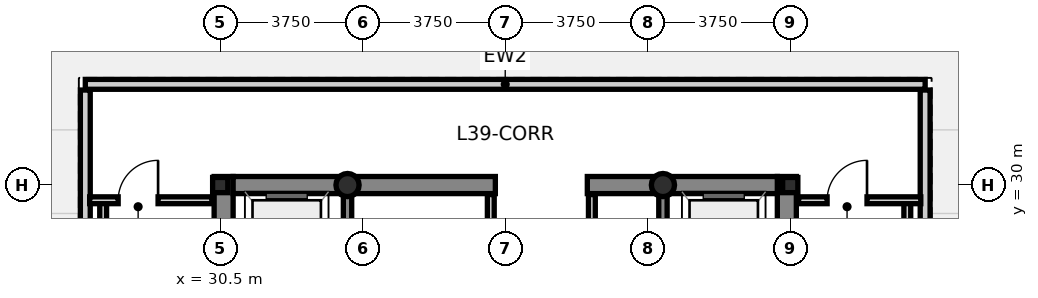
"""IFC4 building model, lengths in metres.
Left out: names, types, materials, properties, quantities, classifications, styles, units other than length and angle.
Written with IfcOpenShell. Run it as: python <this file> out.ifc"""

import sys

from ifc_helpers import new_model, si_unit, direction, frame, frame_2d, origin, origin_2d, place, context, subcontext, project, spatial, rectangle, hollow_circle, i_section, extrude, source, transform, mapped, element, fill, save


model = new_model("IFC4")
c1 = context("Model", 3, precision=1e-05, world=origin(), true_north=direction((0.0, 1.0)))
c2 = subcontext(c1, "Body", "Model", "MODEL_VIEW")
j1 = project(units=[si_unit("LENGTHUNIT", "METRE"), si_unit("PLANEANGLEUNIT", "RADIAN")], contexts=[c1])
p1 = place(None, origin())
s1 = spatial("IfcSite", under=j1, at=p1, CompositionType="ELEMENT")
p2 = place(p1, origin())
s2 = spatial("IfcBuilding", under=s1, at=p2, CompositionType="ELEMENT")
p3 = place(p2, frame((0.0, 0.0, 150.05)))
s3 = spatial("IfcBuildingStorey", under=s2, at=p3, CompositionType="ELEMENT", Elevation=150.05)
m1 = source(origin(), c2, "Body", "SweptSolid", [
    extrude(i_section(OverallWidth=0.4, OverallDepth=0.4, WebThickness=0.02, FlangeThickness=0.032, at=origin_2d()), origin(), (0.0, 0.0, 1.0), 4.8),
])
for number, where, z_axis, x_axis in (
    (1, (45.5, 30.0, 0.0), (0.0, 0.0, 1.0), (1.0, 0.0, 0.0)),
    (2, (30.5, 30.0, 0.0), (0.0, 0.0, 1.0), (1.0, 0.0, 0.0)),
):
    element("IfcColumn", number, at=place(p3, frame(where, z_axis=z_axis, x_axis=x_axis)), inside=s3, PredefinedType="COLUMN", context=c2, shape_type="MappedRepresentation", body=[
        mapped(m1, transform((0.0, 0.0, 0.0), scale=1.0)),
    ])
m2 = source(origin(), c2, "Body", "SweptSolid", [
    extrude(hollow_circle(Radius=0.305, WallThickness=0.025, at=origin_2d()), origin(), (0.0, 0.0, 1.0), 4.8),
])
for number, where, z_axis, x_axis in (
    (3, (33.85, 30.0, 0.0), (0.0, 0.0, 1.0), (1.0, 0.0, 0.0)),
    (4, (42.15, 30.0, 0.0), (0.0, 0.0, 1.0), (1.0, 0.0, 0.0)),
):
    element("IfcColumn", number, at=place(p3, frame(where, z_axis=z_axis, x_axis=x_axis)), inside=s3, PredefinedType="COLUMN", context=c2, shape_type="MappedRepresentation", body=[
        mapped(m2, transform((0.0, 0.0, 0.0), scale=1.0)),
    ])
p4 = place(p3, frame((30.59, 16.95, 0.0), z_axis=(0.0, 0.0, 1.0), x_axis=(0.0, 1.0, 0.0)))
e5 = element("IfcWall", 5, at=p4, inside=s3, PredefinedType="SHEAR", context=c2, shape_type="SweptSolid", body=[
    extrude(rectangle(XDim=13.275, YDim=0.5, at=frame_2d((6.638, 0.0))), origin(), (0.0, 0.0, 1.0), 4.8),
])
p5 = place(p4, frame((6.4, 0.0, 0.0)))
e6 = element("IfcOpeningElement", 6, at=p5, cuts=e5, PredefinedType="OPENING", context=c2, shape_type="SweptSolid", body=[
    extrude(rectangle(XDim=1.12, YDim=2.15, at=frame_2d((0.56, 1.075))), frame((0.0, 0.262, 0.0), z_axis=(0.0, -1.0, 0.0), x_axis=(1.0, 0.0, 0.0)), (0.0, 0.0, 1.0), 0.524),
])
p6 = place(p4, frame((10.85, 0.0, 0.0)))
e7 = element("IfcOpeningElement", 7, at=p6, cuts=e5, PredefinedType="OPENING", context=c2, shape_type="SweptSolid", body=[
    extrude(rectangle(XDim=1.2, YDim=2.2, at=frame_2d((0.6, 1.1))), frame((0.0, 0.262, 0.0), z_axis=(0.0, -1.0, 0.0), x_axis=(1.0, 0.0, 0.0)), (0.0, 0.0, 1.0), 0.524),
])
p7 = place(p3, frame((45.41, 16.95, 0.0), z_axis=(0.0, 0.0, 1.0), x_axis=(0.0, 1.0, 0.0)))
e8 = element("IfcWall", 8, at=p7, inside=s3, PredefinedType="SHEAR", context=c2, shape_type="SweptSolid", body=[
    extrude(rectangle(XDim=13.275, YDim=0.5, at=frame_2d((6.638, 0.0))), origin(), (0.0, 0.0, 1.0), 4.8),
])
p8 = place(p7, frame((6.4, 0.0, 0.0)))
e9 = element("IfcOpeningElement", 9, at=p8, cuts=e8, PredefinedType="OPENING", context=c2, shape_type="SweptSolid", body=[
    extrude(rectangle(XDim=1.12, YDim=2.15, at=frame_2d((0.56, 1.075))), frame((0.0, 0.262, 0.0), z_axis=(0.0, -1.0, 0.0), x_axis=(1.0, 0.0, 0.0)), (0.0, 0.0, 1.0), 0.524),
])
p9 = place(p7, frame((10.85, 0.0, 0.0)))
e10 = element("IfcOpeningElement", 10, at=p9, cuts=e8, PredefinedType="OPENING", context=c2, shape_type="SweptSolid", body=[
    extrude(rectangle(XDim=1.2, YDim=2.2, at=frame_2d((0.6, 1.1))), frame((0.0, 0.262, 0.0), z_axis=(0.0, -1.0, 0.0), x_axis=(1.0, 0.0, 0.0)), (0.0, 0.0, 1.0), 0.524),
])
p10 = place(p3, frame((30.84, 30.0, 0.0), z_axis=(0.0, 0.0, 1.0), x_axis=(1.0, 0.0, 0.0)))
e11 = element("IfcWall", 11, at=p10, inside=s3, PredefinedType="SHEAR", context=c2, shape_type="SweptSolid", body=[
    extrude(rectangle(XDim=2.9, YDim=0.45, at=frame_2d((1.45, 0.0))), origin(), (0.0, 0.0, 1.0), 4.8),
])
p11 = place(p3, frame((33.96, 30.0, 0.0), z_axis=(0.0, 0.0, 1.0), x_axis=(1.0, 0.0, 0.0)))
e12 = element("IfcWall", 12, at=p11, inside=s3, PredefinedType="SHEAR", context=c2, shape_type="SweptSolid", body=[
    extrude(rectangle(XDim=3.78, YDim=0.45, at=frame_2d((1.89, 0.0))), origin(), (0.0, 0.0, 1.0), 4.8),
])
p12 = place(p3, frame((40.16, 30.0, 0.0), z_axis=(0.0, 0.0, 1.0), x_axis=(1.0, 0.0, 0.0)))
e13 = element("IfcWall", 13, at=p12, inside=s3, PredefinedType="SHEAR", context=c2, shape_type="SweptSolid", body=[
    extrude(rectangle(XDim=1.88, YDim=0.45, at=frame_2d((0.94, 0.0))), origin(), (0.0, 0.0, 1.0), 4.8),
])
p13 = place(p3, frame((42.26, 30.0, 0.0), z_axis=(0.0, 0.0, 1.0), x_axis=(1.0, 0.0, 0.0)))
e14 = element("IfcWall", 14, at=p13, inside=s3, PredefinedType="SHEAR", context=c2, shape_type="SweptSolid", body=[
    extrude(rectangle(XDim=2.9, YDim=0.45, at=frame_2d((1.45, 0.0))), origin(), (0.0, 0.0, 1.0), 4.8),
])
for number, where, z_axis, x_axis in (
    (15, (33.85, 16.95, 0.0), (0.0, 0.0, 1.0), (0.0, 1.0, 0.0)),
    (16, (42.15, 16.95, 0.0), (0.0, 0.0, 1.0), (0.0, 1.0, 0.0)),
):
    element("IfcWall", number, at=place(p3, frame(where, z_axis=z_axis, x_axis=x_axis)), inside=s3, PredefinedType="SHEAR", context=c2, shape_type="SweptSolid", body=[
        extrude(rectangle(XDim=13.275, YDim=0.22, at=frame_2d((6.638, 0.0))), origin(), (0.0, 0.0, 1.0), 4.8),
    ])
p14 = place(p3, frame((26.95, 32.65, 0.0), z_axis=(0.0, 0.0, 1.0), x_axis=(1.0, 0.0, 0.0)))
e17 = element("IfcWall", 17, at=p14, inside=s3, PredefinedType="STANDARD", context=c2, shape_type="SweptSolid", body=[
    extrude(rectangle(XDim=22.1, YDim=0.26, at=frame_2d((11.05, 0.0))), origin(), (0.0, 0.0, 1.0), 4.228),
])
p15 = place(p3, frame((26.95, 15.5, 0.0), z_axis=(0.0, 0.0, 1.0), x_axis=(0.0, 1.0, 0.0)))
e18 = element("IfcWall", 18, at=p15, inside=s3, PredefinedType="STANDARD", context=c2, shape_type="SweptSolid", body=[
    extrude(rectangle(XDim=17.0, YDim=0.26, at=frame_2d((8.5, 0.0))), origin(), (0.0, 0.0, 1.0), 4.228),
])
p16 = place(p15, frame((3.5, 0.0, 0.0)))
e19 = element("IfcOpeningElement", 19, at=p16, cuts=e18, PredefinedType="OPENING", context=c2, shape_type="SweptSolid", body=[
    extrude(rectangle(XDim=1.1, YDim=2.2, at=frame_2d((0.55, 1.1))), frame((0.0, 0.142, 0.0), z_axis=(0.0, -1.0, 0.0), x_axis=(1.0, 0.0, 0.0)), (0.0, 0.0, 1.0), 0.284),
])
p17 = place(p3, frame((49.05, 15.5, 0.0), z_axis=(0.0, 0.0, 1.0), x_axis=(0.0, 1.0, 0.0)))
e20 = element("IfcWall", 20, at=p17, inside=s3, PredefinedType="STANDARD", context=c2, shape_type="SweptSolid", body=[
    extrude(rectangle(XDim=17.0, YDim=0.26, at=frame_2d((8.5, 0.0))), origin(), (0.0, 0.0, 1.0), 4.228),
])
p18 = place(p17, frame((3.5, 0.0, 0.0)))
e21 = element("IfcOpeningElement", 21, at=p18, cuts=e20, PredefinedType="OPENING", context=c2, shape_type="SweptSolid", body=[
    extrude(rectangle(XDim=1.1, YDim=2.2, at=frame_2d((0.55, 1.1))), frame((0.0, 0.142, 0.0), z_axis=(0.0, -1.0, 0.0), x_axis=(1.0, 0.0, 0.0)), (0.0, 0.0, 1.0), 0.284),
])
for number, where, z_axis, x_axis in (
    (22, (37.62, 27.64, 0.0), (0.0, 0.0, 1.0), (0.0, 1.0, 0.0)),
    (23, (40.28, 27.64, 0.0), (0.0, 0.0, 1.0), (0.0, 1.0, 0.0)),
):
    element("IfcWall", number, at=place(p3, frame(where, z_axis=z_axis, x_axis=x_axis)), inside=s3, PredefinedType="PARTITIONING", context=c2, shape_type="SweptSolid", body=[
        extrude(rectangle(XDim=2.11, YDim=0.18, at=frame_2d((1.055, 0.0))), origin(), (0.0, 0.0, 1.0), 4.55),
    ])
p19 = place(p3, frame((27.42, 23.2, 0.0), z_axis=(0.0, 0.0, 1.0), x_axis=(0.0, 1.0, 0.0)))
e24 = element("IfcWall", 24, at=p19, inside=s3, PredefinedType="PARTITIONING", context=c2, shape_type="SweptSolid", body=[
    extrude(rectangle(XDim=6.4, YDim=0.18, at=frame_2d((3.2, 0.0))), origin(), (0.0, 0.0, 1.0), 4.228),
])
p20 = place(p3, frame((27.065, 29.6, 0.0), z_axis=(0.0, 0.0, 1.0), x_axis=(1.0, 0.0, 0.0)))
e25 = element("IfcWall", 25, at=p20, inside=s3, PredefinedType="PARTITIONING", context=c2, shape_type="SweptSolid", body=[
    extrude(rectangle(XDim=3.215, YDim=0.18, at=frame_2d((1.607, 0.0))), origin(), (0.0, 0.0, 1.0), 4.074),
])
p21 = place(p20, frame((0.75, 0.0, 0.0)))
e26 = element("IfcOpeningElement", 26, at=p21, cuts=e25, PredefinedType="OPENING", context=c2, shape_type="SweptSolid", body=[
    extrude(rectangle(XDim=1.05, YDim=2.15, at=frame_2d((0.525, 1.075))), frame((0.0, 0.102, 0.0), z_axis=(0.0, -1.0, 0.0), x_axis=(1.0, 0.0, 0.0)), (0.0, 0.0, 1.0), 0.204),
])
p22 = place(p3, frame((48.58, 23.2, 0.0), z_axis=(0.0, 0.0, 1.0), x_axis=(0.0, 1.0, 0.0)))
e27 = element("IfcWall", 27, at=p22, inside=s3, PredefinedType="PARTITIONING", context=c2, shape_type="SweptSolid", body=[
    extrude(rectangle(XDim=6.4, YDim=0.18, at=frame_2d((3.2, 0.0))), origin(), (0.0, 0.0, 1.0), 4.228),
])
p23 = place(p3, frame((45.72, 29.6, 0.0), z_axis=(0.0, 0.0, 1.0), x_axis=(1.0, 0.0, 0.0)))
e28 = element("IfcWall", 28, at=p23, inside=s3, PredefinedType="PARTITIONING", context=c2, shape_type="SweptSolid", body=[
    extrude(rectangle(XDim=3.215, YDim=0.18, at=frame_2d((1.607, 0.0))), origin(), (0.0, 0.0, 1.0), 4.074),
])
p24 = place(p23, frame((0.75, 0.0, 0.0)))
e29 = element("IfcOpeningElement", 29, at=p24, cuts=e28, PredefinedType="OPENING", context=c2, shape_type="SweptSolid", body=[
    extrude(rectangle(XDim=1.05, YDim=2.15, at=frame_2d((0.525, 1.075))), frame((0.0, 0.102, 0.0), z_axis=(0.0, -1.0, 0.0), x_axis=(1.0, 0.0, 0.0)), (0.0, 0.0, 1.0), 0.204),
])
p25 = place(p21, origin())
e30 = element("IfcDoor", 30, at=p25, inside=s3, OperationType="SINGLE_SWING_RIGHT", PredefinedType="DOOR", context=c2, shape_type="SweptSolid", body=[
    extrude(rectangle(XDim=1.05, YDim=2.15, at=frame_2d((0.525, 1.075))), frame((0.0, 0.025, 0.0), z_axis=(0.0, -1.0, 0.0), x_axis=(1.0, 0.0, 0.0)), (0.0, 0.0, 1.0), 0.05),
])
fill(e26, e30)
p26 = place(p24, origin())
e31 = element("IfcDoor", 31, at=p26, inside=s3, OperationType="SINGLE_SWING_RIGHT", PredefinedType="DOOR", context=c2, shape_type="SweptSolid", body=[
    extrude(rectangle(XDim=1.05, YDim=2.15, at=frame_2d((0.525, 1.075))), frame((0.0, 0.025, 0.0), z_axis=(0.0, -1.0, 0.0), x_axis=(1.0, 0.0, 0.0)), (0.0, 0.0, 1.0), 0.05),
])
fill(e29, e31)
save(model, sys.argv[1])
